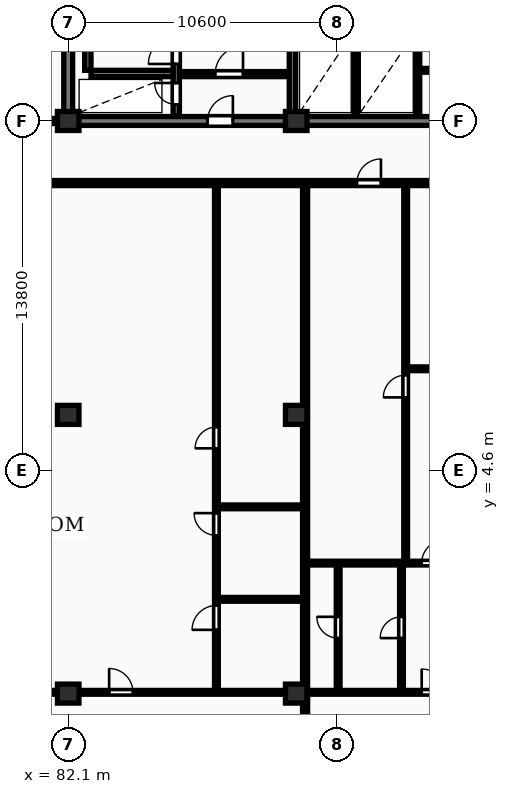
"""IFC4 building model, lengths in metres.
Left out: names, types, materials, properties, quantities, classifications, styles, units other than length and angle.
Written with IfcOpenShell. Run it as: python <this file> out.ifc"""

import sys

from ifc_helpers import new_model, si_unit, direction, frame, frame_2d, origin, origin_2d, place, context, subcontext, project, spatial, rectangle, extrude, element, fill, save


model = new_model("IFC4")
c1 = context("Model", 3, precision=1e-05, world=origin(), true_north=direction((0.0, 1.0)))
c2 = subcontext(c1, "Body", "Model", "MODEL_VIEW")
j1 = project(units=[si_unit("LENGTHUNIT", "METRE"), si_unit("PLANEANGLEUNIT", "RADIAN")], contexts=[c1])
p1 = place(None, origin())
s1 = spatial("IfcSite", under=j1, at=p1, CompositionType="ELEMENT")
p2 = place(p1, origin())
s2 = spatial("IfcBuilding", under=s1, at=p2, CompositionType="ELEMENT")
p3 = place(p2, frame((0.0, 0.0, 100.3)))
s3 = spatial("IfcBuildingStorey", under=s2, at=p3, CompositionType="ELEMENT", Elevation=100.3)
for number, where, z_axis, x_axis in (
    (1, (82.1, -4.2, 0.0), (0.0, 0.0, 1.0), (1.0, 0.0, 0.0)),
    (2, (82.1, 6.8, 0.0), (0.0, 0.0, 1.0), (1.0, 0.0, 0.0)),
    (3, (82.1, 18.4, 0.0), (0.0, 0.0, 1.0), (1.0, 0.0, 0.0)),
    (4, (91.1, -4.2, 0.0), (0.0, 0.0, 1.0), (1.0, 0.0, 0.0)),
    (5, (91.1, 6.8, 0.0), (0.0, 0.0, 1.0), (1.0, 0.0, 0.0)),
    (6, (91.1, 18.4, 0.0), (0.0, 0.0, 1.0), (1.0, 0.0, 0.0)),
):
    element("IfcColumn", number, at=place(p3, frame(where, z_axis=z_axis, x_axis=x_axis)), inside=s3, PredefinedType="COLUMN", context=c2, shape_type="SweptSolid", body=[
        extrude(rectangle(XDim=0.85, YDim=0.75, at=origin_2d()), origin(), (0.0, 0.0, 1.0), 3.25),
    ])
p4 = place(p3, frame((82.1, 18.575, 0.0), z_axis=(0.0, 0.0, 1.0), x_axis=(0.0, 1.0, 0.0)))
e7 = element("IfcWall", 7, at=p4, inside=s3, PredefinedType="SHEAR", context=c2, shape_type="SweptSolid", body=[
    extrude(rectangle(XDim=11.65, YDim=0.35, at=frame_2d((5.825, 0.0))), origin(), (0.0, 0.0, 1.0), 3.25),
])
p5 = place(p3, frame((81.925, 18.4, 0.0), z_axis=(0.0, 0.0, 1.0), x_axis=(1.0, 0.0, 0.0)))
e8 = element("IfcWall", 8, at=p5, inside=s3, PredefinedType="SHEAR", context=c2, shape_type="SweptSolid", body=[
    extrude(rectangle(XDim=36.265, YDim=0.35, at=frame_2d((18.132, 0.0))), origin(), (0.0, 0.0, 1.0), 3.25),
])
p6 = place(p5, frame((5.675, 0.0, 0.0)))
e9 = element("IfcOpeningElement", 9, at=p6, cuts=e8, PredefinedType="OPENING", context=c2, shape_type="SweptSolid", body=[
    extrude(rectangle(XDim=1.0, YDim=2.15, at=frame_2d((0.5, 1.075))), frame((0.0, 0.185, 0.0), z_axis=(0.0, -1.0, 0.0), x_axis=(1.0, 0.0, 0.0)), (0.0, 0.0, 1.0), 0.37),
])
p7 = place(p5, frame((21.925, 0.0, 0.0)))
e10 = element("IfcOpeningElement", 10, at=p7, cuts=e8, PredefinedType="OPENING", context=c2, shape_type="SweptSolid", body=[
    extrude(rectangle(XDim=1.5, YDim=2.2, at=frame_2d((0.75, 1.1))), frame((0.0, 0.185, 0.0), z_axis=(0.0, -1.0, 0.0), x_axis=(1.0, 0.0, 0.0)), (0.0, 0.0, 1.0), 0.37),
])
p8 = place(p5, frame((29.875, 0.0, 0.0)))
e11 = element("IfcOpeningElement", 11, at=p8, cuts=e8, PredefinedType="OPENING", context=c2, shape_type="SweptSolid", body=[
    extrude(rectangle(XDim=1.0, YDim=2.15, at=frame_2d((0.5, 1.075))), frame((0.0, 0.185, 0.0), z_axis=(0.0, -1.0, 0.0), x_axis=(1.0, 0.0, 0.0)), (0.0, 0.0, 1.0), 0.37),
])
p9 = place(p3, frame((82.875, 20.4, 0.0), z_axis=(0.0, 0.0, 1.0), x_axis=(0.0, 1.0, 0.0)))
e12 = element("IfcWall", 12, at=p9, inside=s3, PredefinedType="SHEAR", context=c2, shape_type="SweptSolid", body=[
    extrude(rectangle(XDim=7.6, YDim=0.25, at=frame_2d((3.8, 0.0))), origin(), (0.0, 0.0, 1.0), 3.25),
])
p10 = place(p3, frame((86.365, 18.6, 0.0), z_axis=(0.0, 0.0, 1.0), x_axis=(0.0, 1.0, 0.0)))
e13 = element("IfcWall", 13, at=p10, inside=s3, PredefinedType="SHEAR", context=c2, shape_type="SweptSolid", body=[
    extrude(rectangle(XDim=11.6, YDim=0.25, at=frame_2d((5.8, 0.0))), origin(), (0.0, 0.0, 1.0), 3.25),
])
p11 = place(p10, frame((0.45, 0.0, 0.0)))
e14 = element("IfcOpeningElement", 14, at=p11, cuts=e13, PredefinedType="OPENING", context=c2, shape_type="SweptSolid", body=[
    extrude(rectangle(XDim=0.85, YDim=2.05, at=frame_2d((0.425, 1.025))), frame((0.0, 0.135, 0.0), z_axis=(0.0, -1.0, 0.0), x_axis=(1.0, 0.0, 0.0)), (0.0, 0.0, 1.0), 0.27),
])
p12 = place(p10, frame((2.05, 0.0, 0.0)))
e15 = element("IfcOpeningElement", 15, at=p12, cuts=e13, PredefinedType="OPENING", context=c2, shape_type="SweptSolid", body=[
    extrude(rectangle(XDim=1.1, YDim=2.1, at=frame_2d((0.55, 1.05))), frame((0.0, 0.135, 0.0), z_axis=(0.0, -1.0, 0.0), x_axis=(1.0, 0.0, 0.0)), (0.0, 0.0, 1.0), 0.27),
])
p13 = place(p10, frame((9.95, 0.0, 0.0)))
e16 = element("IfcOpeningElement", 16, at=p13, cuts=e13, PredefinedType="OPENING", context=c2, shape_type="SweptSolid", body=[
    extrude(rectangle(XDim=0.85, YDim=2.05, at=frame_2d((0.425, 1.025))), frame((0.0, 0.135, 0.0), z_axis=(0.0, -1.0, 0.0), x_axis=(1.0, 0.0, 0.0)), (0.0, 0.0, 1.0), 0.27),
])
p14 = place(p3, frame((83.0, 20.275, 0.0), z_axis=(0.0, 0.0, 1.0), x_axis=(1.0, 0.0, 0.0)))
e17 = element("IfcWall", 17, at=p14, inside=s3, PredefinedType="SHEAR", context=c2, shape_type="SweptSolid", body=[
    extrude(rectangle(XDim=3.24, YDim=0.25, at=frame_2d((1.62, 0.0))), origin(), (0.0, 0.0, 1.0), 3.25),
])
p15 = place(p3, frame((86.5, 20.25, 0.0), z_axis=(0.0, 0.0, 1.0), x_axis=(1.0, 0.0, 0.0)))
e18 = element("IfcWall", 18, at=p15, inside=s3, PredefinedType="PARTITIONING", context=c2, shape_type="SweptSolid", body=[
    extrude(rectangle(XDim=4.32, YDim=0.2, at=frame_2d((2.16, 0.0))), origin(), (0.0, 0.0, 1.0), 2.97),
])
p16 = place(p15, frame((1.4, 0.0, 0.0)))
e19 = element("IfcOpeningElement", 19, at=p16, cuts=e18, PredefinedType="OPENING", context=c2, shape_type="SweptSolid", body=[
    extrude(rectangle(XDim=1.1, YDim=2.1, at=frame_2d((0.55, 1.05))), frame((0.0, 0.11, 0.0), z_axis=(0.0, -1.0, 0.0), x_axis=(1.0, 0.0, 0.0)), (0.0, 0.0, 1.0), 0.22),
])
p17 = place(p3, frame((90.95, 18.6, 0.0), z_axis=(0.0, 0.0, 1.0), x_axis=(0.0, 1.0, 0.0)))
e20 = element("IfcWall", 20, at=p17, inside=s3, PredefinedType="SHEAR", context=c2, shape_type="SweptSolid", body=[
    extrude(rectangle(XDim=11.6, YDim=0.25, at=frame_2d((5.8, 0.0))), origin(), (0.0, 0.0, 1.0), 3.25),
])
p18 = place(p17, frame((4.6, 0.0, 0.0)))
e21 = element("IfcOpeningElement", 21, at=p18, cuts=e20, PredefinedType="OPENING", context=c2, shape_type="SweptSolid", body=[
    extrude(rectangle(XDim=1.1, YDim=2.1, at=frame_2d((0.55, 1.05))), frame((0.0, 0.135, 0.0), z_axis=(0.0, -1.0, 0.0), x_axis=(1.0, 0.0, 0.0)), (0.0, 0.0, 1.0), 0.27),
])
for number, where, z_axis, x_axis in (
    (22, (93.45, 18.6, 0.0), (0.0, 0.0, 1.0), (0.0, 1.0, 0.0)),
    (23, (95.9, 18.6, 0.0), (0.0, 0.0, 1.0), (0.0, 1.0, 0.0)),
):
    element("IfcWall", number, at=place(p3, frame(where, z_axis=z_axis, x_axis=x_axis)), inside=s3, PredefinedType="PARTITIONING", context=c2, shape_type="SweptSolid", body=[
        extrude(rectangle(XDim=3.6, YDim=0.15, at=frame_2d((1.8, 0.0))), origin(), (0.0, 0.0, 1.0), 2.97),
    ])
p19 = place(p3, frame((95.9, 20.4, 0.0), z_axis=(0.0, 0.0, 1.0), x_axis=(1.0, 0.0, 0.0)))
e24 = element("IfcWall", 24, at=p19, inside=s3, PredefinedType="PARTITIONING", context=c2, shape_type="SweptSolid", body=[
    extrude(rectangle(XDim=6.7, YDim=0.15, at=frame_2d((3.35, 0.0))), origin(), (0.0, 0.0, 1.0), 2.97),
])
p20 = place(p19, frame((1.6, 0.0, 0.0)))
e25 = element("IfcOpeningElement", 25, at=p20, cuts=e24, PredefinedType="OPENING", context=c2, shape_type="SweptSolid", body=[
    extrude(rectangle(XDim=0.88, YDim=2.06, at=frame_2d((0.44, 1.03))), frame((0.0, 0.085, 0.0), z_axis=(0.0, -1.0, 0.0), x_axis=(1.0, 0.0, 0.0)), (0.0, 0.0, 1.0), 0.17),
])
p21 = place(p3, frame((72.7, 18.4, 0.0), z_axis=(0.0, 0.0, 1.0), x_axis=(1.0, 0.0, 0.0)))
e26 = element("IfcWall", 26, at=p21, inside=s3, PredefinedType="PARTITIONING", context=c2, shape_type="SweptSolid", body=[
    extrude(rectangle(XDim=9.25, YDim=0.2, at=frame_2d((4.625, 0.0))), origin(), (0.0, 0.0, 1.0), 2.358),
])
p22 = place(p21, frame((4.15, 0.0, 0.0)))
e27 = element("IfcOpeningElement", 27, at=p22, cuts=e26, PredefinedType="OPENING", context=c2, shape_type="SweptSolid", body=[
    extrude(rectangle(XDim=0.95, YDim=2.15, at=frame_2d((0.475, 1.075))), frame((0.0, 0.11, 0.0), z_axis=(0.0, -1.0, 0.0), x_axis=(1.0, 0.0, 0.0)), (0.0, 0.0, 1.0), 0.22),
])
p23 = place(p3, frame((91.45, -8.7, 0.0), z_axis=(0.0, 0.0, 1.0), x_axis=(0.0, 1.0, 0.0)))
e28 = element("IfcWall", 28, at=p23, inside=s3, PredefinedType="PARTITIONING", context=c2, shape_type="SweptSolid", body=[
    extrude(rectangle(XDim=24.57, YDim=0.2, at=frame_2d((12.285, 0.0))), origin(), (0.0, 0.0, 1.0), 2.97),
])
for number, where, z_axis, x_axis in (
    (29, (88.01, -0.48, 0.0), (0.0, 0.0, 1.0), (1.0, 0.0, 0.0)),
    (30, (88.01, 3.17, 0.0), (0.0, 0.0, 1.0), (1.0, 0.0, 0.0)),
):
    element("IfcWall", number, at=place(p3, frame(where, z_axis=z_axis, x_axis=x_axis)), inside=s3, PredefinedType="PARTITIONING", context=c2, shape_type="SweptSolid", body=[
        extrude(rectangle(XDim=3.36, YDim=0.15, at=frame_2d((1.68, 0.0))), origin(), (0.0, 0.0, 1.0), 2.97),
    ])
p24 = place(p3, frame((87.95, -4.09, 0.0), z_axis=(0.0, 0.0, 1.0), x_axis=(0.0, 1.0, 0.0)))
e31 = element("IfcWall", 31, at=p24, inside=s3, PredefinedType="PARTITIONING", context=c2, shape_type="SweptSolid", body=[
    extrude(rectangle(XDim=19.98, YDim=0.15, at=frame_2d((9.99, 0.0))), origin(), (0.0, 0.0, 1.0), 2.97),
])
p25 = place(p24, frame((2.406, 0.0, 0.0)))
e32 = element("IfcOpeningElement", 32, at=p25, cuts=e31, PredefinedType="OPENING", context=c2, shape_type="SweptSolid", body=[
    extrude(rectangle(XDim=0.96, YDim=2.1, at=frame_2d((0.48, 1.05))), frame((0.0, 0.085, 0.0), z_axis=(0.0, -1.0, 0.0), x_axis=(1.0, 0.0, 0.0)), (0.0, 0.0, 1.0), 0.17),
])
p26 = place(p24, frame((6.133, 0.0, 0.0)))
e33 = element("IfcOpeningElement", 33, at=p26, cuts=e31, PredefinedType="OPENING", context=c2, shape_type="SweptSolid", body=[
    extrude(rectangle(XDim=0.88, YDim=2.06, at=frame_2d((0.44, 1.03))), frame((0.0, 0.085, 0.0), z_axis=(0.0, -1.0, 0.0), x_axis=(1.0, 0.0, 0.0)), (0.0, 0.0, 1.0), 0.17),
])
p27 = place(p24, frame((9.57, 0.0, 0.0)))
e34 = element("IfcOpeningElement", 34, at=p27, cuts=e31, PredefinedType="OPENING", context=c2, shape_type="SweptSolid", body=[
    extrude(rectangle(XDim=0.84, YDim=2.04, at=frame_2d((0.42, 1.02))), frame((0.0, 0.085, 0.0), z_axis=(0.0, -1.0, 0.0), x_axis=(1.0, 0.0, 0.0)), (0.0, 0.0, 1.0), 0.17),
])
p28 = place(p3, frame((72.78, -4.15, 0.0), z_axis=(0.0, 0.0, 1.0), x_axis=(1.0, 0.0, 0.0)))
e35 = element("IfcWall", 35, at=p28, inside=s3, PredefinedType="PARTITIONING", context=c2, shape_type="SweptSolid", body=[
    extrude(rectangle(XDim=18.59, YDim=0.15, at=frame_2d((9.295, 0.0))), origin(), (0.0, 0.0, 1.0), 2.663),
])
p29 = place(p28, frame((6.685, 0.0, 0.0)))
e36 = element("IfcOpeningElement", 36, at=p29, cuts=e35, PredefinedType="OPENING", context=c2, shape_type="SweptSolid", body=[
    extrude(rectangle(XDim=0.94, YDim=2.1, at=frame_2d((0.47, 1.05))), frame((0.0, 0.085, 0.0), z_axis=(0.0, -1.0, 0.0), x_axis=(1.0, 0.0, 0.0)), (0.0, 0.0, 1.0), 0.17),
])
p30 = place(p28, frame((10.935, 0.0, 0.0)))
e37 = element("IfcOpeningElement", 37, at=p30, cuts=e35, PredefinedType="OPENING", context=c2, shape_type="SweptSolid", body=[
    extrude(rectangle(XDim=0.94, YDim=2.1, at=frame_2d((0.47, 1.05))), frame((0.0, 0.085, 0.0), z_axis=(0.0, -1.0, 0.0), x_axis=(1.0, 0.0, 0.0)), (0.0, 0.0, 1.0), 0.17),
])
p31 = place(p3, frame((95.48, 8.62, 0.0), z_axis=(0.0, 0.0, 1.0), x_axis=(1.0, 0.0, 0.0)))
e38 = element("IfcWall", 38, at=p31, inside=s3, PredefinedType="PARTITIONING", context=c2, shape_type="SweptSolid", body=[
    extrude(rectangle(XDim=6.015, YDim=0.15, at=frame_2d((3.008, 0.0))), origin(), (0.0, 0.0, 1.0), 2.97),
])
p32 = place(p31, frame((2.124, 0.0, 0.0)))
e39 = element("IfcOpeningElement", 39, at=p32, cuts=e38, PredefinedType="OPENING", context=c2, shape_type="SweptSolid", body=[
    extrude(rectangle(XDim=0.88, YDim=2.06, at=frame_2d((0.44, 1.03))), frame((0.0, 0.085, 0.0), z_axis=(0.0, -1.0, 0.0), x_axis=(1.0, 0.0, 0.0)), (0.0, 0.0, 1.0), 0.17),
])
p33 = place(p3, frame((95.42, 0.99, 0.0), z_axis=(0.0, 0.0, 1.0), x_axis=(0.0, 1.0, 0.0)))
e40 = element("IfcWall", 40, at=p33, inside=s3, PredefinedType="PARTITIONING", context=c2, shape_type="SweptSolid", body=[
    extrude(rectangle(XDim=14.9, YDim=0.15, at=frame_2d((7.45, 0.0))), origin(), (0.0, 0.0, 1.0), 2.97),
])
p34 = place(p33, frame((6.5, 0.0, 0.0)))
e41 = element("IfcOpeningElement", 41, at=p34, cuts=e40, PredefinedType="OPENING", context=c2, shape_type="SweptSolid", body=[
    extrude(rectangle(XDim=0.88, YDim=2.06, at=frame_2d((0.44, 1.03))), frame((0.0, 0.085, 0.0), z_axis=(0.0, -1.0, 0.0), x_axis=(1.0, 0.0, 0.0)), (0.0, 0.0, 1.0), 0.17),
])
p35 = place(p3, frame((92.755, -4.09, 0.0), z_axis=(0.0, 0.0, 1.0), x_axis=(0.0, 1.0, 0.0)))
e42 = element("IfcWall", 42, at=p35, inside=s3, PredefinedType="PARTITIONING", context=c2, shape_type="SweptSolid", body=[
    extrude(rectangle(XDim=5.0, YDim=0.15, at=frame_2d((2.5, 0.0))), origin(), (0.0, 0.0, 1.0), 2.97),
])
p36 = place(p35, frame((2.08, 0.0, 0.0)))
e43 = element("IfcOpeningElement", 43, at=p36, cuts=e42, PredefinedType="OPENING", context=c2, shape_type="SweptSolid", body=[
    extrude(rectangle(XDim=0.84, YDim=2.04, at=frame_2d((0.42, 1.02))), frame((0.0, 0.085, 0.0), z_axis=(0.0, -1.0, 0.0), x_axis=(1.0, 0.0, 0.0)), (0.0, 0.0, 1.0), 0.17),
])
p37 = place(p3, frame((95.255, -4.09, 0.0), z_axis=(0.0, 0.0, 1.0), x_axis=(0.0, 1.0, 0.0)))
e44 = element("IfcWall", 44, at=p37, inside=s3, PredefinedType="PARTITIONING", context=c2, shape_type="SweptSolid", body=[
    extrude(rectangle(XDim=5.0, YDim=0.15, at=frame_2d((2.5, 0.0))), origin(), (0.0, 0.0, 1.0), 2.97),
])
p38 = place(p37, frame((2.08, 0.0, 0.0)))
e45 = element("IfcOpeningElement", 45, at=p38, cuts=e44, PredefinedType="OPENING", context=c2, shape_type="SweptSolid", body=[
    extrude(rectangle(XDim=0.84, YDim=2.04, at=frame_2d((0.42, 1.02))), frame((0.0, 0.085, 0.0), z_axis=(0.0, -1.0, 0.0), x_axis=(1.0, 0.0, 0.0)), (0.0, 0.0, 1.0), 0.17),
])
p39 = place(p3, frame((91.53, 0.95, 0.0), z_axis=(0.0, 0.0, 1.0), x_axis=(1.0, 0.0, 0.0)))
e46 = element("IfcWall", 46, at=p39, inside=s3, PredefinedType="PARTITIONING", context=c2, shape_type="SweptSolid", body=[
    extrude(rectangle(XDim=9.965, YDim=0.15, at=frame_2d((4.982, 0.0))), origin(), (0.0, 0.0, 1.0), 2.97),
])
p40 = place(p39, frame((4.522, 0.0, 0.0)))
e47 = element("IfcOpeningElement", 47, at=p40, cuts=e46, PredefinedType="OPENING", context=c2, shape_type="SweptSolid", body=[
    extrude(rectangle(XDim=0.92, YDim=2.08, at=frame_2d((0.46, 1.04))), frame((0.0, 0.085, 0.0), z_axis=(0.0, -1.0, 0.0), x_axis=(1.0, 0.0, 0.0)), (0.0, 0.0, 1.0), 0.17),
])
p41 = place(p3, frame((91.53, -4.15, 0.0), z_axis=(0.0, 0.0, 1.0), x_axis=(1.0, 0.0, 0.0)))
e48 = element("IfcWall", 48, at=p41, inside=s3, PredefinedType="PARTITIONING", context=c2, shape_type="SweptSolid", body=[
    extrude(rectangle(XDim=9.965, YDim=0.15, at=frame_2d((4.982, 0.0))), origin(), (0.0, 0.0, 1.0), 2.663),
])
p42 = place(p41, frame((4.522, 0.0, 0.0)))
e49 = element("IfcOpeningElement", 49, at=p42, cuts=e48, PredefinedType="OPENING", context=c2, shape_type="SweptSolid", body=[
    extrude(rectangle(XDim=0.92, YDim=2.08, at=frame_2d((0.46, 1.04))), frame((0.0, 0.085, 0.0), z_axis=(0.0, -1.0, 0.0), x_axis=(1.0, 0.0, 0.0)), (0.0, 0.0, 1.0), 0.17),
])
p43 = place(p3, frame((72.7, 15.95, 0.0), z_axis=(0.0, 0.0, 1.0), x_axis=(1.0, 0.0, 0.0)))
e50 = element("IfcWall", 50, at=p43, inside=s3, PredefinedType="PARTITIONING", context=c2, shape_type="SweptSolid", body=[
    extrude(rectangle(XDim=58.0, YDim=0.2, at=frame_2d((29.0, 0.0))), origin(), (0.0, 0.0, 1.0), 2.97),
])
p44 = place(p43, frame((6.539, 0.0, 0.0)))
e51 = element("IfcOpeningElement", 51, at=p44, cuts=e50, PredefinedType="OPENING", context=c2, shape_type="SweptSolid", body=[
    extrude(rectangle(XDim=1.22, YDim=2.18, at=frame_2d((0.61, 1.09))), frame((0.0, 0.11, 0.0), z_axis=(0.0, -1.0, 0.0), x_axis=(1.0, 0.0, 0.0)), (0.0, 0.0, 1.0), 0.22),
])
p45 = place(p43, frame((20.795, 0.0, 0.0)))
e52 = element("IfcOpeningElement", 52, at=p45, cuts=e50, PredefinedType="OPENING", context=c2, shape_type="SweptSolid", body=[
    extrude(rectangle(XDim=0.95, YDim=2.15, at=frame_2d((0.475, 1.075))), frame((0.0, 0.11, 0.0), z_axis=(0.0, -1.0, 0.0), x_axis=(1.0, 0.0, 0.0)), (0.0, 0.0, 1.0), 0.22),
])
p46 = place(p43, frame((30.92, 0.0, 0.0)))
e53 = element("IfcOpeningElement", 53, at=p46, cuts=e50, PredefinedType="OPENING", context=c2, shape_type="SweptSolid", body=[
    extrude(rectangle(XDim=0.95, YDim=2.15, at=frame_2d((0.475, 1.075))), frame((0.0, 0.11, 0.0), z_axis=(0.0, -1.0, 0.0), x_axis=(1.0, 0.0, 0.0)), (0.0, 0.0, 1.0), 0.22),
])
p47 = place(p43, frame((41.67, 0.0, 0.0)))
e54 = element("IfcOpeningElement", 54, at=p47, cuts=e50, PredefinedType="OPENING", context=c2, shape_type="SweptSolid", body=[
    extrude(rectangle(XDim=0.95, YDim=2.15, at=frame_2d((0.475, 1.075))), frame((0.0, 0.11, 0.0), z_axis=(0.0, -1.0, 0.0), x_axis=(1.0, 0.0, 0.0)), (0.0, 0.0, 1.0), 0.22),
])
p48 = place(p6, origin())
e55 = element("IfcDoor", 55, at=p48, inside=s3, OperationType="SINGLE_SWING_RIGHT", PredefinedType="DOOR", context=c2, shape_type="SweptSolid", body=[
    extrude(rectangle(XDim=1.0, YDim=2.15, at=frame_2d((0.5, 1.075))), frame((0.0, 0.025, 0.0), z_axis=(0.0, -1.0, 0.0), x_axis=(1.0, 0.0, 0.0)), (0.0, 0.0, 1.0), 0.05),
])
fill(e9, e55)
p49 = place(p11, origin())
e56 = element("IfcDoor", 56, at=p49, inside=s3, OperationType="SINGLE_SWING_RIGHT", PredefinedType="DOOR", context=c2, shape_type="SweptSolid", body=[
    extrude(rectangle(XDim=0.85, YDim=2.05, at=frame_2d((0.425, 1.025))), frame((0.0, 0.025, 0.0), z_axis=(0.0, -1.0, 0.0), x_axis=(1.0, 0.0, 0.0)), (0.0, 0.0, 1.0), 0.05),
])
fill(e14, e56)
p50 = place(p12, origin())
e57 = element("IfcDoor", 57, at=p50, inside=s3, OperationType="SINGLE_SWING_LEFT", PredefinedType="DOOR", context=c2, shape_type="SweptSolid", body=[
    extrude(rectangle(XDim=1.1, YDim=2.1, at=frame_2d((0.55, 1.05))), frame((0.0, 0.025, 0.0), z_axis=(0.0, -1.0, 0.0), x_axis=(1.0, 0.0, 0.0)), (0.0, 0.0, 1.0), 0.05),
])
fill(e15, e57)
p51 = place(p16, origin())
e58 = element("IfcDoor", 58, at=p51, inside=s3, OperationType="SINGLE_SWING_RIGHT", PredefinedType="DOOR", context=c2, shape_type="SweptSolid", body=[
    extrude(rectangle(XDim=1.1, YDim=2.1, at=frame_2d((0.55, 1.05))), frame((0.0, 0.025, 0.0), z_axis=(0.0, -1.0, 0.0), x_axis=(1.0, 0.0, 0.0)), (0.0, 0.0, 1.0), 0.05),
])
fill(e19, e58)
p52 = place(p25, origin())
e59 = element("IfcDoor", 59, at=p52, inside=s3, OperationType="SINGLE_SWING_LEFT", PredefinedType="DOOR", context=c2, shape_type="SweptSolid", body=[
    extrude(rectangle(XDim=0.96, YDim=2.1, at=frame_2d((0.48, 1.05))), frame((0.0, 0.025, 0.0), z_axis=(0.0, -1.0, 0.0), x_axis=(1.0, 0.0, 0.0)), (0.0, 0.0, 1.0), 0.05),
])
fill(e32, e59)
p53 = place(p26, origin())
e60 = element("IfcDoor", 60, at=p53, inside=s3, OperationType="SINGLE_SWING_RIGHT", PredefinedType="DOOR", context=c2, shape_type="SweptSolid", body=[
    extrude(rectangle(XDim=0.88, YDim=2.06, at=frame_2d((0.44, 1.03))), frame((0.0, 0.025, 0.0), z_axis=(0.0, -1.0, 0.0), x_axis=(1.0, 0.0, 0.0)), (0.0, 0.0, 1.0), 0.05),
])
fill(e33, e60)
p54 = place(p27, origin())
e61 = element("IfcDoor", 61, at=p54, inside=s3, OperationType="SINGLE_SWING_LEFT", PredefinedType="DOOR", context=c2, shape_type="SweptSolid", body=[
    extrude(rectangle(XDim=0.84, YDim=2.04, at=frame_2d((0.42, 1.02))), frame((0.0, 0.025, 0.0), z_axis=(0.0, -1.0, 0.0), x_axis=(1.0, 0.0, 0.0)), (0.0, 0.0, 1.0), 0.05),
])
fill(e34, e61)
p55 = place(p30, origin())
e62 = element("IfcDoor", 62, at=p55, inside=s3, OperationType="SINGLE_SWING_LEFT", PredefinedType="DOOR", context=c2, shape_type="SweptSolid", body=[
    extrude(rectangle(XDim=0.94, YDim=2.1, at=frame_2d((0.47, 1.05))), frame((0.0, 0.025, 0.0), z_axis=(0.0, -1.0, 0.0), x_axis=(1.0, 0.0, 0.0)), (0.0, 0.0, 1.0), 0.05),
])
fill(e37, e62)
p56 = place(p34, origin())
e63 = element("IfcDoor", 63, at=p56, inside=s3, OperationType="SINGLE_SWING_LEFT", PredefinedType="DOOR", context=c2, shape_type="SweptSolid", body=[
    extrude(rectangle(XDim=0.88, YDim=2.06, at=frame_2d((0.44, 1.03))), frame((0.0, 0.025, 0.0), z_axis=(0.0, -1.0, 0.0), x_axis=(1.0, 0.0, 0.0)), (0.0, 0.0, 1.0), 0.05),
])
fill(e41, e63)
p57 = place(p36, origin())
e64 = element("IfcDoor", 64, at=p57, inside=s3, OperationType="SINGLE_SWING_RIGHT", PredefinedType="DOOR", context=c2, shape_type="SweptSolid", body=[
    extrude(rectangle(XDim=0.84, YDim=2.04, at=frame_2d((0.42, 1.02))), frame((0.0, 0.025, 0.0), z_axis=(0.0, -1.0, 0.0), x_axis=(1.0, 0.0, 0.0)), (0.0, 0.0, 1.0), 0.05),
])
fill(e43, e64)
p58 = place(p38, origin())
e65 = element("IfcDoor", 65, at=p58, inside=s3, OperationType="SINGLE_SWING_LEFT", PredefinedType="DOOR", context=c2, shape_type="SweptSolid", body=[
    extrude(rectangle(XDim=0.84, YDim=2.04, at=frame_2d((0.42, 1.02))), frame((0.0, 0.025, 0.0), z_axis=(0.0, -1.0, 0.0), x_axis=(1.0, 0.0, 0.0)), (0.0, 0.0, 1.0), 0.05),
])
fill(e45, e65)
p59 = place(p40, origin())
e66 = element("IfcDoor", 66, at=p59, inside=s3, OperationType="SINGLE_SWING_RIGHT", PredefinedType="DOOR", context=c2, shape_type="SweptSolid", body=[
    extrude(rectangle(XDim=0.92, YDim=2.08, at=frame_2d((0.46, 1.04))), frame((0.0, 0.025, 0.0), z_axis=(0.0, -1.0, 0.0), x_axis=(1.0, 0.0, 0.0)), (0.0, 0.0, 1.0), 0.05),
])
fill(e47, e66)
p60 = place(p42, origin())
e67 = element("IfcDoor", 67, at=p60, inside=s3, OperationType="SINGLE_SWING_LEFT", PredefinedType="DOOR", context=c2, shape_type="SweptSolid", body=[
    extrude(rectangle(XDim=0.92, YDim=2.08, at=frame_2d((0.46, 1.04))), frame((0.0, 0.025, 0.0), z_axis=(0.0, -1.0, 0.0), x_axis=(1.0, 0.0, 0.0)), (0.0, 0.0, 1.0), 0.05),
])
fill(e49, e67)
p61 = place(p45, origin())
e68 = element("IfcDoor", 68, at=p61, inside=s3, OperationType="SINGLE_SWING_RIGHT", PredefinedType="DOOR", context=c2, shape_type="SweptSolid", body=[
    extrude(rectangle(XDim=0.95, YDim=2.15, at=frame_2d((0.475, 1.075))), frame((0.0, 0.025, 0.0), z_axis=(0.0, -1.0, 0.0), x_axis=(1.0, 0.0, 0.0)), (0.0, 0.0, 1.0), 0.05),
])
fill(e52, e68)
save(model, sys.argv[1])
